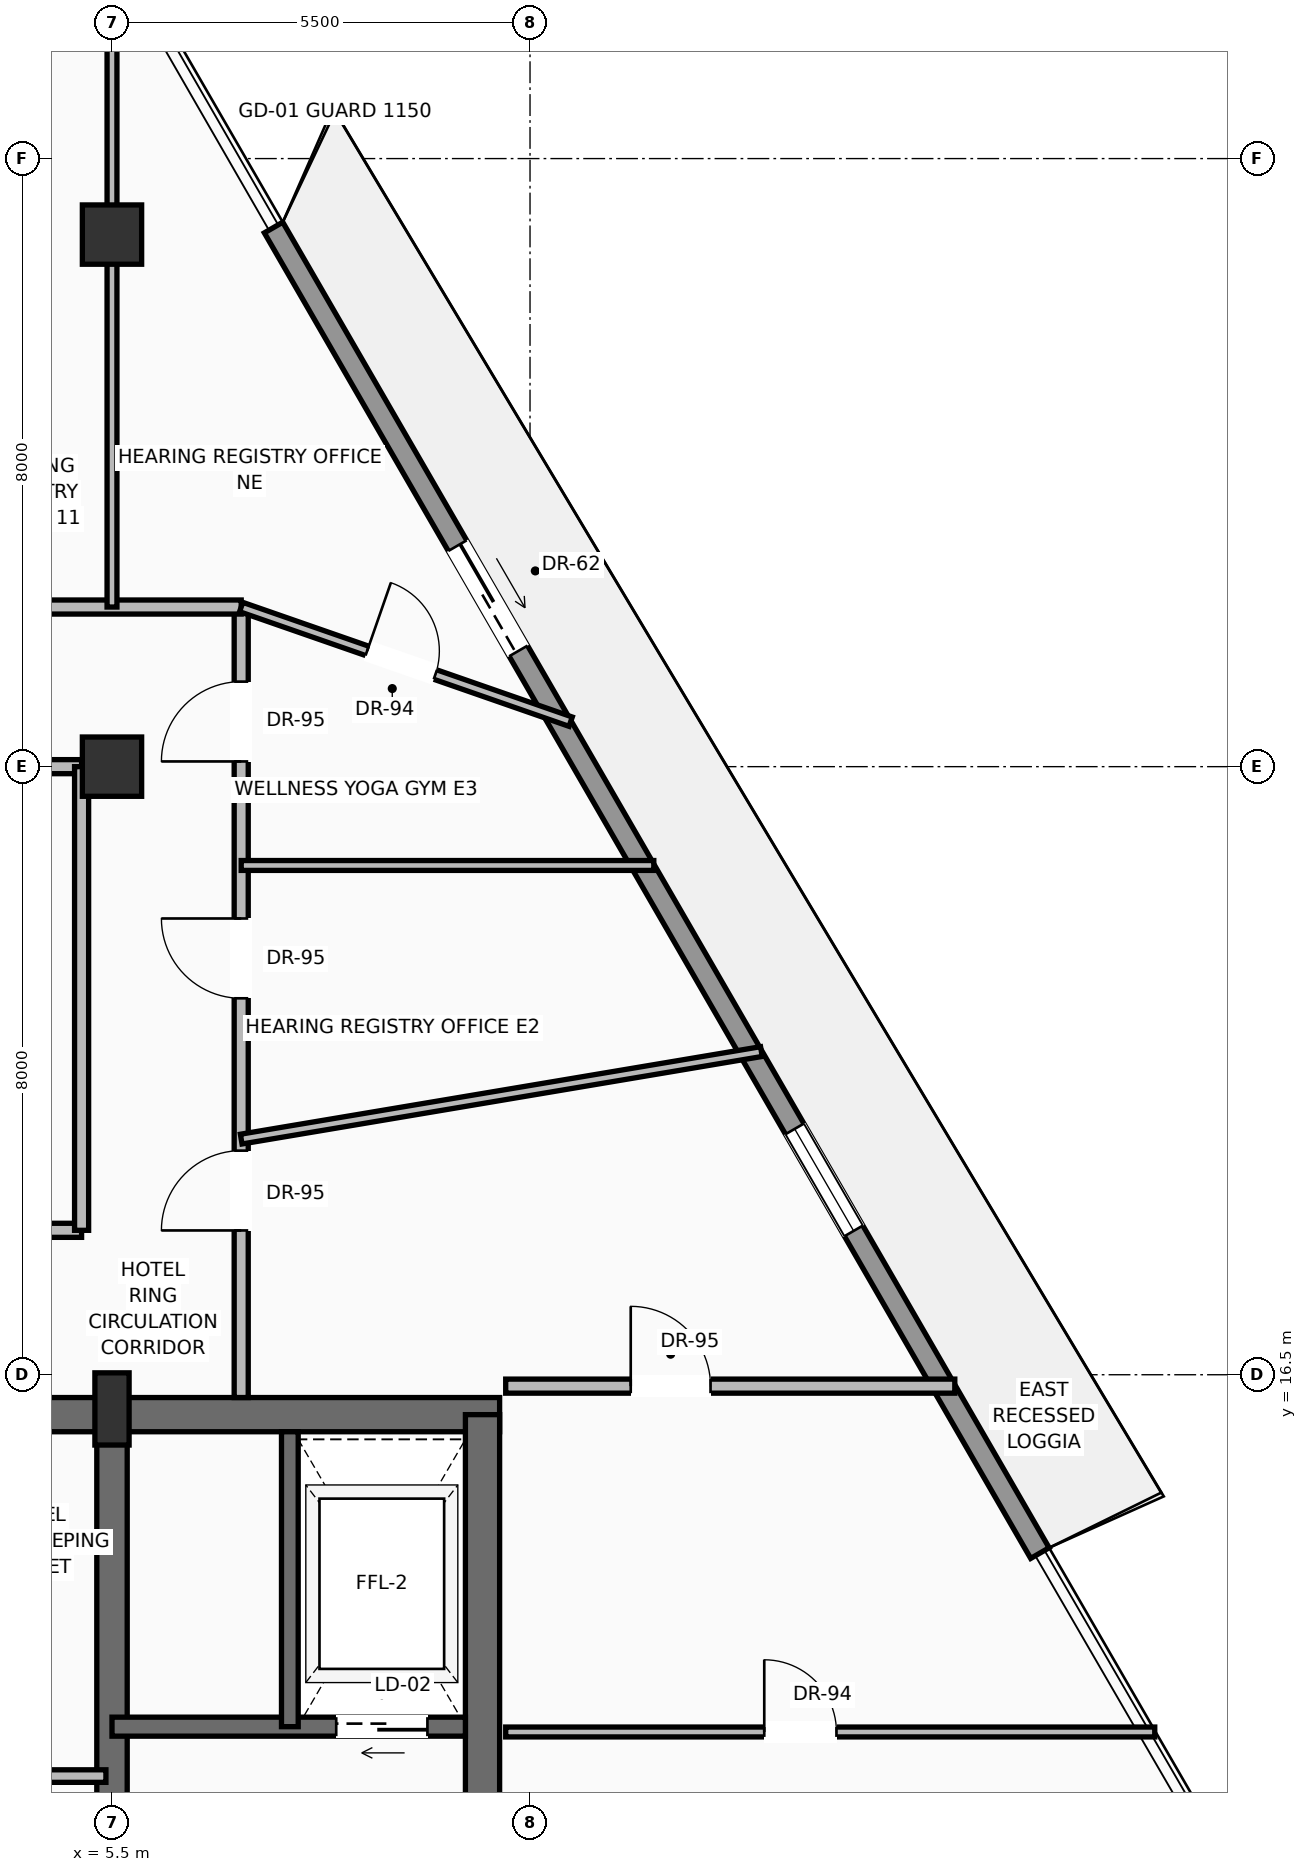
"""IFC4 building model, lengths in metres.
Left out: names, types, materials, properties, quantities, classifications, styles, units other than length and angle.
Written with IfcOpenShell. Run it as: python <this file> out.ifc"""

import sys

from ifc_helpers import new_model, si_unit, direction, frame, frame_2d, origin, origin_2d, place, context, subcontext, project, spatial, rectangle, extrude, source, transform, mapped, element, fill, save


model = new_model("IFC4")
c1 = context("Model", 3, precision=1e-05, world=origin(), true_north=direction((0.0, 1.0)))
c2 = subcontext(c1, "Body", "Model", "MODEL_VIEW")
j1 = project(units=[si_unit("LENGTHUNIT", "METRE"), si_unit("PLANEANGLEUNIT", "RADIAN")], contexts=[c1])
p1 = place(None, origin())
s1 = spatial("IfcSite", under=j1, at=p1, CompositionType="ELEMENT")
p2 = place(p1, origin())
s2 = spatial("IfcBuilding", under=s1, at=p2, CompositionType="ELEMENT")
p3 = place(p2, frame((0.0, 0.0, 293.7)))
s3 = spatial("IfcBuildingStorey", under=s2, at=p3, CompositionType="ELEMENT", Elevation=293.7)
p4 = place(p3, frame((-10.6, 15.975, 0.0), z_axis=(0.0, 0.0, 1.0), x_axis=(1.0, 0.0, 0.0)))
e1 = element("IfcWall", 1, at=p4, inside=s3, PredefinedType="SHEAR", context=c2, shape_type="SweptSolid", body=[
    extrude(rectangle(XDim=21.2, YDim=0.45, at=frame_2d((10.6, 0.0))), origin(), (0.0, 0.0, 1.0), 3.24),
])
p5 = place(p4, frame((3.17, 0.0, 0.0)))
e2 = element("IfcOpeningElement", 2, at=p5, cuts=e1, PredefinedType="OPENING", context=c2, shape_type="SweptSolid", body=[
    extrude(rectangle(XDim=1.3, YDim=2.3, at=frame_2d((0.65, 1.15))), frame((0.0, 0.235, 0.0), z_axis=(0.0, -1.0, 0.0), x_axis=(1.0, 0.0, 0.0)), (0.0, 0.0, 1.0), 0.47),
])
p6 = place(p4, frame((9.6, 0.0, 0.0)))
e3 = element("IfcOpeningElement", 3, at=p6, cuts=e1, PredefinedType="OPENING", context=c2, shape_type="SweptSolid", body=[
    extrude(rectangle(XDim=2.0, YDim=2.4, at=frame_2d((1.0, 1.2))), frame((0.0, 0.235, 0.0), z_axis=(0.0, -1.0, 0.0), x_axis=(1.0, 0.0, 0.0)), (0.0, 0.0, 1.0), 0.47),
])
p7 = place(p3, frame((10.375, 0.625, 0.0), z_axis=(0.0, 0.0, 1.0), x_axis=(0.0, 1.0, 0.0)))
e4 = element("IfcWall", 4, at=p7, inside=s3, PredefinedType="SHEAR", context=c2, shape_type="SweptSolid", body=[
    extrude(rectangle(XDim=15.35, YDim=0.45, at=frame_2d((7.675, 0.0))), origin(), (0.0, 0.0, 1.0), 3.24),
])
p8 = place(p3, frame((5.5, 0.625, 0.0), z_axis=(0.0, 0.0, 1.0), x_axis=(0.0, 1.0, 0.0)))
e5 = element("IfcWall", 5, at=p8, inside=s3, PredefinedType="SHEAR", context=c2, shape_type="SweptSolid", body=[
    extrude(rectangle(XDim=15.35, YDim=0.4, at=frame_2d((7.675, 0.0))), origin(), (0.0, 0.0, 1.0), 3.24),
])
p9 = place(p8, frame((8.875, 0.0, 0.0)))
e6 = element("IfcOpeningElement", 6, at=p9, cuts=e5, PredefinedType="OPENING", context=c2, shape_type="SweptSolid", body=[
    extrude(rectangle(XDim=1.1, YDim=2.2, at=frame_2d((0.55, 1.1))), frame((0.0, 0.21, 0.0), z_axis=(0.0, -1.0, 0.0), x_axis=(1.0, 0.0, 0.0)), (0.0, 0.0, 1.0), 0.42),
])
m1 = source(origin(), c2, "Body", "SweptSolid", [
    extrude(rectangle(XDim=0.45, YDim=0.95, at=origin_2d()), origin(), (0.0, 0.0, 1.0), 3.45),
])
p10 = place(p3, frame((5.5, 16.05, 0.0), z_axis=(0.0, 0.0, 1.0), x_axis=(1.0, 0.0, 0.0)))
e7 = element("IfcColumn", 7, at=p10, inside=s3, PredefinedType="PILASTER", context=c2, shape_type="MappedRepresentation", body=[
    mapped(m1, transform((0.0, 0.0, 0.0), scale=1.0)),
])
m2 = source(origin(), c2, "Body", "SweptSolid", [
    extrude(rectangle(XDim=0.78, YDim=0.78, at=origin_2d()), origin(), (0.0, 0.0, 1.0), 3.45),
])
for number, where, z_axis, x_axis in (
    (8, (5.5, 24.5, 0.0), (0.0, 0.0, 1.0), (1.0, 0.0, 0.0)),
    (9, (5.5, 31.5, 0.0), (0.0, 0.0, 1.0), (1.0, 0.0, 0.0)),
):
    element("IfcColumn", number, at=place(p3, frame(where, z_axis=z_axis, x_axis=x_axis)), inside=s3, PredefinedType="COLUMN", context=c2, shape_type="MappedRepresentation", body=[
        mapped(m2, transform((0.0, 0.0, 0.0), scale=1.0)),
    ])
p11 = place(p3, frame((7.626, 31.593, 0.0), z_axis=(0.0, 0.0, 1.0), x_axis=(0.500533605719, -0.865717107112, 0.0)))
e10 = element("IfcWall", 10, at=p11, inside=s3, PredefinedType="SOLIDWALL", context=c2, shape_type="SweptSolid", body=[
    extrude(rectangle(XDim=20.145, YDim=0.28, at=frame_2d((10.072, 0.0))), origin(), (0.0, 0.0, 1.0), 2.82),
])
p12 = place(p11, frame((4.835, 0.0, 0.0)))
e11 = element("IfcOpeningElement", 11, at=p12, cuts=e10, PredefinedType="OPENING", context=c2, shape_type="SweptSolid", body=[
    extrude(rectangle(XDim=1.6, YDim=2.35, at=frame_2d((0.8, 1.175))), frame((0.0, 0.15, 0.0), z_axis=(0.0, -1.0, 0.0), x_axis=(1.0, 0.0, 0.0)), (0.0, 0.0, 1.0), 0.3),
])
p13 = place(p11, frame((13.698, 0.0, 0.9)))
e12 = element("IfcOpeningElement", 12, at=p13, cuts=e10, PredefinedType="OPENING", context=c2, shape_type="SweptSolid", body=[
    extrude(rectangle(XDim=1.55, YDim=1.75, at=frame_2d((0.775, 0.875))), frame((0.0, 0.15, 0.0), z_axis=(0.0, -1.0, 0.0), x_axis=(1.0, 0.0, 0.0)), (0.0, 0.0, 1.0), 0.3),
])
p14 = place(p3, frame((10.15, 11.87, 0.0), z_axis=(0.0, 0.0, 1.0), x_axis=(-1.0, 0.0, 0.0)))
e13 = element("IfcWall", 13, at=p14, inside=s3, PredefinedType="SOLIDWALL", context=c2, shape_type="SweptSolid", body=[
    extrude(rectangle(XDim=4.65, YDim=0.25, at=frame_2d((2.325, 0.0))), origin(), (0.0, 0.0, 1.0), 3.24),
])
p15 = place(p14, frame((0.5, 0.0, 0.0)))
e14 = element("IfcOpeningElement", 14, at=p15, cuts=e13, PredefinedType="OPENING", context=c2, shape_type="SweptSolid", body=[
    extrude(rectangle(XDim=1.2, YDim=2.25, at=frame_2d((0.6, 1.125))), frame((0.0, 0.135, 0.0), z_axis=(0.0, -1.0, 0.0), x_axis=(1.0, 0.0, 0.0)), (0.0, 0.0, 1.0), 0.27),
])
p16 = place(p3, frame((7.84, 11.87, 0.0), z_axis=(0.0, 0.0, 1.0), x_axis=(0.0, 1.0, 0.0)))
e15 = element("IfcWall", 15, at=p16, inside=s3, PredefinedType="SOLIDWALL", context=c2, shape_type="SweptSolid", body=[
    extrude(rectangle(XDim=3.88, YDim=0.22, at=frame_2d((1.94, 0.0))), origin(), (0.0, 0.0, 1.0), 3.24),
])
p17 = place(p3, frame((3.54, 11.22, 0.0), z_axis=(0.0, 0.0, 1.0), x_axis=(1.0, 0.0, 0.0)))
e16 = element("IfcWall", 16, at=p17, inside=s3, PredefinedType="PARTITIONING", context=c2, shape_type="SweptSolid", body=[
    extrude(rectangle(XDim=1.88, YDim=0.165, at=frame_2d((0.94, 0.0))), origin(), (0.0, 0.0, 1.0), 3.232),
])
p18 = place(p3, frame((-5.1, 18.4, 0.0), z_axis=(0.0, 0.0, 1.0), x_axis=(1.0, 0.0, 0.0)))
e17 = element("IfcWall", 17, at=p18, inside=s3, PredefinedType="PARTITIONING", context=c2, shape_type="SweptSolid", body=[
    extrude(rectangle(XDim=10.2, YDim=0.185, at=frame_2d((5.1, 0.0))), origin(), (0.0, 0.0, 1.0), 3.232),
])
p19 = place(p18, frame((4.625, 0.0, 0.0)))
e18 = element("IfcOpeningElement", 18, at=p19, cuts=e17, PredefinedType="OPENING", context=c2, shape_type="SweptSolid", body=[
    extrude(rectangle(XDim=0.95, YDim=2.2, at=frame_2d((0.475, 1.1))), frame((0.0, 0.103, 0.0), z_axis=(0.0, -1.0, 0.0), x_axis=(1.0, 0.0, 0.0)), (0.0, 0.0, 1.0), 0.205),
])
p20 = place(p3, frame((-5.1, 24.5, 0.0), z_axis=(0.0, 0.0, 1.0), x_axis=(1.0, 0.0, 0.0)))
e19 = element("IfcWall", 19, at=p20, inside=s3, PredefinedType="PARTITIONING", context=c2, shape_type="SweptSolid", body=[
    extrude(rectangle(XDim=10.2, YDim=0.185, at=frame_2d((5.1, 0.0))), origin(), (0.0, 0.0, 1.0), 2.683),
])
p21 = place(p20, frame((4.625, 0.0, 0.0)))
e20 = element("IfcOpeningElement", 20, at=p21, cuts=e19, PredefinedType="OPENING", context=c2, shape_type="SweptSolid", body=[
    extrude(rectangle(XDim=0.95, YDim=2.2, at=frame_2d((0.475, 1.1))), frame((0.0, 0.103, 0.0), z_axis=(0.0, -1.0, 0.0), x_axis=(1.0, 0.0, 0.0)), (0.0, 0.0, 1.0), 0.205),
])
p22 = place(p3, frame((5.1, 18.4, 0.0), z_axis=(0.0, 0.0, 1.0), x_axis=(0.0, 1.0, 0.0)))
e21 = element("IfcWall", 21, at=p22, inside=s3, PredefinedType="PARTITIONING", context=c2, shape_type="SweptSolid", body=[
    extrude(rectangle(XDim=6.1, YDim=0.185, at=frame_2d((3.05, 0.0))), origin(), (0.0, 0.0, 1.0), 3.232),
])
p23 = place(p3, frame((7.2, 16.2, 0.0), z_axis=(0.0, 0.0, 1.0), x_axis=(0.0, 1.0, 0.0)))
e22 = element("IfcWall", 22, at=p23, inside=s3, PredefinedType="PARTITIONING", context=c2, shape_type="SweptSolid", body=[
    extrude(rectangle(XDim=10.4, YDim=0.185, at=frame_2d((5.2, 0.0))), origin(), (0.0, 0.0, 1.0), 3.232),
])
p24 = place(p23, frame((2.198, 0.0, 0.0)))
e23 = element("IfcOpeningElement", 23, at=p24, cuts=e22, PredefinedType="OPENING", context=c2, shape_type="SweptSolid", body=[
    extrude(rectangle(XDim=1.05, YDim=2.25, at=frame_2d((0.525, 1.125))), frame((0.0, 0.103, 0.0), z_axis=(0.0, -1.0, 0.0), x_axis=(1.0, 0.0, 0.0)), (0.0, 0.0, 1.0), 0.205),
])
p25 = place(p23, frame((5.252, 0.0, 0.0)))
e24 = element("IfcOpeningElement", 24, at=p25, cuts=e22, PredefinedType="OPENING", context=c2, shape_type="SweptSolid", body=[
    extrude(rectangle(XDim=1.05, YDim=2.25, at=frame_2d((0.525, 1.125))), frame((0.0, 0.103, 0.0), z_axis=(0.0, -1.0, 0.0), x_axis=(1.0, 0.0, 0.0)), (0.0, 0.0, 1.0), 0.205),
])
p26 = place(p23, frame((8.369, 0.0, 0.0)))
e25 = element("IfcOpeningElement", 25, at=p26, cuts=e22, PredefinedType="OPENING", context=c2, shape_type="SweptSolid", body=[
    extrude(rectangle(XDim=1.05, YDim=2.25, at=frame_2d((0.525, 1.125))), frame((0.0, 0.103, 0.0), z_axis=(0.0, -1.0, 0.0), x_axis=(1.0, 0.0, 0.0)), (0.0, 0.0, 1.0), 0.205),
])
p27 = place(p3, frame((-7.2, 26.6, 0.0), z_axis=(0.0, 0.0, 1.0), x_axis=(1.0, 0.0, 0.0)))
e26 = element("IfcWall", 26, at=p27, inside=s3, PredefinedType="PARTITIONING", context=c2, shape_type="SweptSolid", body=[
    extrude(rectangle(XDim=14.4, YDim=0.185, at=frame_2d((7.2, 0.0))), origin(), (0.0, 0.0, 1.0), 3.232),
])
p28 = place(p27, frame((4.698, 0.0, 0.0)))
e27 = element("IfcOpeningElement", 27, at=p28, cuts=e26, PredefinedType="OPENING", context=c2, shape_type="SweptSolid", body=[
    extrude(rectangle(XDim=1.05, YDim=2.25, at=frame_2d((0.525, 1.125))), frame((0.0, 0.103, 0.0), z_axis=(0.0, -1.0, 0.0), x_axis=(1.0, 0.0, 0.0)), (0.0, 0.0, 1.0), 0.205),
])
p29 = place(p27, frame((6.675, 0.0, 0.0)))
e28 = element("IfcOpeningElement", 28, at=p29, cuts=e26, PredefinedType="OPENING", context=c2, shape_type="SweptSolid", body=[
    extrude(rectangle(XDim=1.05, YDim=2.25, at=frame_2d((0.525, 1.125))), frame((0.0, 0.103, 0.0), z_axis=(0.0, -1.0, 0.0), x_axis=(1.0, 0.0, 0.0)), (0.0, 0.0, 1.0), 0.205),
])
p30 = place(p27, frame((8.653, 0.0, 0.0)))
e29 = element("IfcOpeningElement", 29, at=p30, cuts=e26, PredefinedType="OPENING", context=c2, shape_type="SweptSolid", body=[
    extrude(rectangle(XDim=1.05, YDim=2.25, at=frame_2d((0.525, 1.125))), frame((0.0, 0.103, 0.0), z_axis=(0.0, -1.0, 0.0), x_axis=(1.0, 0.0, 0.0)), (0.0, 0.0, 1.0), 0.205),
])
p31 = place(p3, frame((10.68, 16.35, 0.0), z_axis=(0.0, 0.0, 1.0), x_axis=(1.0, 0.0, 0.0)))
e30 = element("IfcWall", 30, at=p31, inside=s3, PredefinedType="PARTITIONING", context=c2, shape_type="SweptSolid", body=[
    extrude(rectangle(XDim=5.909, YDim=0.185, at=frame_2d((2.955, 0.0))), origin(), (0.0, 0.0, 1.0), 3.232),
])
p32 = place(p31, frame((1.645, 0.0, 0.0)))
e31 = element("IfcOpeningElement", 31, at=p32, cuts=e30, PredefinedType="OPENING", context=c2, shape_type="SweptSolid", body=[
    extrude(rectangle(XDim=1.05, YDim=2.25, at=frame_2d((0.525, 1.125))), frame((0.0, 0.103, 0.0), z_axis=(0.0, -1.0, 0.0), x_axis=(1.0, 0.0, 0.0)), (0.0, 0.0, 1.0), 0.205),
])
p33 = place(p3, frame((7.2, 26.6, 0.0), z_axis=(0.0, 0.0, 1.0), x_axis=(0.94445803841, -0.328632033866, 0.0)))
e32 = element("IfcWall", 32, at=p33, inside=s3, PredefinedType="PARTITIONING", context=c2, shape_type="SweptSolid", body=[
    extrude(rectangle(XDim=4.59, YDim=0.13, at=frame_2d((2.295, 0.0))), origin(), (0.0, 0.0, 1.0), 3.232),
])
p34 = place(p33, frame((1.755, 0.0, 0.0)))
e33 = element("IfcOpeningElement", 33, at=p34, cuts=e32, PredefinedType="OPENING", context=c2, shape_type="SweptSolid", body=[
    extrude(rectangle(XDim=0.95, YDim=2.2, at=frame_2d((0.475, 1.1))), frame((0.0, 0.075, 0.0), z_axis=(0.0, -1.0, 0.0), x_axis=(1.0, 0.0, 0.0)), (0.0, 0.0, 1.0), 0.15),
])
p35 = place(p3, frame((5.5, 26.6, 0.0), z_axis=(0.0, 0.0, 1.0), x_axis=(0.0, 1.0, 0.0)))
e34 = element("IfcWall", 34, at=p35, inside=s3, PredefinedType="PARTITIONING", context=c2, shape_type="SweptSolid", body=[
    extrude(rectangle(XDim=8.929, YDim=0.13, at=frame_2d((4.465, 0.0))), origin(), (0.0, 0.0, 1.0), 2.683),
])
p36 = place(p3, frame((10.68, 11.8, 0.0), z_axis=(0.0, 0.0, 1.0), x_axis=(1.0, 0.0, 0.0)))
e35 = element("IfcWall", 35, at=p36, inside=s3, PredefinedType="PARTITIONING", context=c2, shape_type="SweptSolid", body=[
    extrude(rectangle(XDim=8.54, YDim=0.13, at=frame_2d((4.27, 0.0))), origin(), (0.0, 0.0, 1.0), 3.232),
])
p37 = place(p36, frame((3.402, 0.0, 0.0)))
e36 = element("IfcOpeningElement", 36, at=p37, cuts=e35, PredefinedType="OPENING", context=c2, shape_type="SweptSolid", body=[
    extrude(rectangle(XDim=0.95, YDim=2.2, at=frame_2d((0.475, 1.1))), frame((0.0, 0.075, 0.0), z_axis=(0.0, -1.0, 0.0), x_axis=(1.0, 0.0, 0.0)), (0.0, 0.0, 1.0), 0.15),
])
p38 = place(p3, frame((7.2, 19.6, 0.0), z_axis=(0.0, 0.0, 1.0), x_axis=(0.986143702521, 0.165893333134, 0.0)))
e37 = element("IfcWall", 37, at=p38, inside=s3, PredefinedType="PARTITIONING", context=c2, shape_type="SweptSolid", body=[
    extrude(rectangle(XDim=6.94, YDim=0.13, at=frame_2d((3.47, 0.0))), origin(), (0.0, 0.0, 1.0), 2.885),
])
p39 = place(p3, frame((7.2, 23.2, 0.0), z_axis=(0.0, 0.0, 1.0), x_axis=(1.0, 0.0, 0.0)))
e38 = element("IfcWall", 38, at=p39, inside=s3, PredefinedType="PARTITIONING", context=c2, shape_type="SweptSolid", body=[
    extrude(rectangle(XDim=5.428, YDim=0.13, at=frame_2d((2.714, 0.0))), origin(), (0.0, 0.0, 1.0), 3.232),
])
m3 = source(origin(), c2, "Body", "SweptSolid", [
    extrude(rectangle(XDim=1.6, YDim=2.35, at=frame_2d((0.8, 1.175))), frame((0.0, 0.025, 0.0), z_axis=(0.0, -1.0, 0.0), x_axis=(1.0, 0.0, 0.0)), (0.0, 0.0, 1.0), 0.05),
])
p40 = place(p12, origin())
e39 = element("IfcDoor", 39, at=p40, inside=s3, OperationType="SLIDING_TO_RIGHT", PredefinedType="DOOR", context=c2, shape_type="MappedRepresentation", body=[
    mapped(m3, transform((0.0, 0.0, 0.0), scale=1.0)),
])
fill(e11, e39)
m4 = source(origin(), c2, "Body", "SweptSolid", [
    extrude(rectangle(XDim=1.55, YDim=1.75, at=frame_2d((0.775, 0.875))), frame((0.0, 0.03, 0.0), z_axis=(0.0, -1.0, 0.0), x_axis=(1.0, 0.0, 0.0)), (0.0, 0.0, 1.0), 0.06),
])
p41 = place(p13, origin())
e40 = element("IfcWindow", 40, at=p41, inside=s3, PartitioningType="SINGLE_PANEL", PredefinedType="WINDOW", context=c2, shape_type="MappedRepresentation", body=[
    mapped(m4, transform((0.0, 0.0, 0.0), scale=1.0)),
])
fill(e12, e40)
m5 = source(origin(), c2, "Body", "SweptSolid", [
    extrude(rectangle(XDim=1.2, YDim=2.25, at=frame_2d((0.6, 1.125))), frame((0.0, 0.025, 0.0), z_axis=(0.0, -1.0, 0.0), x_axis=(1.0, 0.0, 0.0)), (0.0, 0.0, 1.0), 0.05),
])
p42 = place(p15, origin())
e41 = element("IfcDoor", 41, at=p42, inside=s3, OperationType="SLIDING_TO_RIGHT", PredefinedType="DOOR", context=c2, shape_type="MappedRepresentation", body=[
    mapped(m5, transform((0.0, 0.0, 0.0), scale=1.0)),
])
fill(e14, e41)
m6 = source(origin(), c2, "Body", "SweptSolid", [
    extrude(rectangle(XDim=1.05, YDim=2.25, at=frame_2d((0.525, 1.125))), frame((0.0, 0.025, 0.0), z_axis=(0.0, -1.0, 0.0), x_axis=(1.0, 0.0, 0.0)), (0.0, 0.0, 1.0), 0.05),
])
p43 = place(p32, origin())
e42 = element("IfcDoor", 42, at=p43, inside=s3, OperationType="SINGLE_SWING_LEFT", PredefinedType="DOOR", context=c2, shape_type="MappedRepresentation", body=[
    mapped(m6, transform((0.0, 0.0, 0.0), scale=1.0)),
])
fill(e31, e42)
m7 = source(origin(), c2, "Body", "SweptSolid", [
    extrude(rectangle(XDim=0.95, YDim=2.2, at=frame_2d((0.475, 1.1))), frame((0.0, 0.025, 0.0), z_axis=(0.0, -1.0, 0.0), x_axis=(1.0, 0.0, 0.0)), (0.0, 0.0, 1.0), 0.05),
])
p44 = place(p37, origin())
e43 = element("IfcDoor", 43, at=p44, inside=s3, OperationType="SINGLE_SWING_LEFT", PredefinedType="DOOR", context=c2, shape_type="MappedRepresentation", body=[
    mapped(m7, transform((0.0, 0.0, 0.0), scale=1.0)),
])
fill(e36, e43)
p45 = place(p24, origin())
e44 = element("IfcDoor", 44, at=p45, inside=s3, OperationType="SINGLE_SWING_LEFT", PredefinedType="DOOR", context=c2, shape_type="MappedRepresentation", body=[
    mapped(m6, transform((0.0, 0.0, 0.0), scale=1.0)),
])
fill(e23, e44)
p46 = place(p25, origin())
e45 = element("IfcDoor", 45, at=p46, inside=s3, OperationType="SINGLE_SWING_RIGHT", PredefinedType="DOOR", context=c2, shape_type="MappedRepresentation", body=[
    mapped(m6, transform((0.0, 0.0, 0.0), scale=1.0)),
])
fill(e24, e45)
p47 = place(p26, origin())
e46 = element("IfcDoor", 46, at=p47, inside=s3, OperationType="SINGLE_SWING_LEFT", PredefinedType="DOOR", context=c2, shape_type="MappedRepresentation", body=[
    mapped(m6, transform((0.0, 0.0, 0.0), scale=1.0)),
])
fill(e25, e46)
p48 = place(p34, origin())
e47 = element("IfcDoor", 47, at=p48, inside=s3, OperationType="SINGLE_SWING_LEFT", PredefinedType="DOOR", context=c2, shape_type="MappedRepresentation", body=[
    mapped(m7, transform((0.0, 0.0, 0.0), scale=1.0)),
])
fill(e33, e47)
save(model, sys.argv[1])
